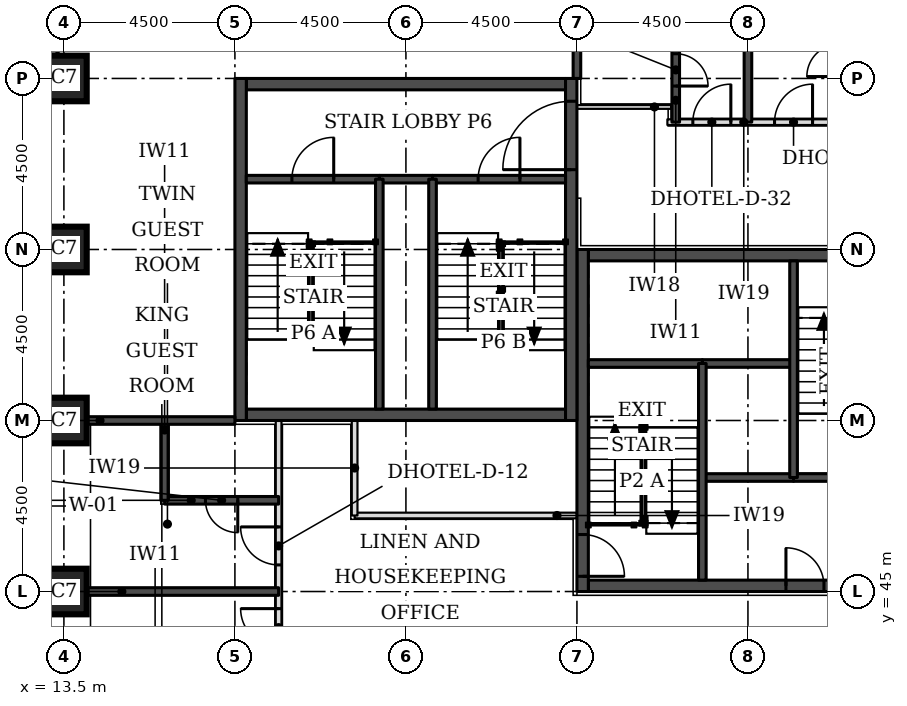
"""IFC4 building model, lengths in metres.
Left out: names, types, materials, properties, quantities, classifications, styles, units other than length and angle.
Written with IfcOpenShell. Run it as: python <this file> out.ifc"""

import sys

from ifc_helpers import new_model, si_unit, direction, frame, frame_2d, origin, origin_2d, place, context, subcontext, project, spatial, rectangle, extrude, element, fill, save


model = new_model("IFC4")
c1 = context("Model", 3, precision=1e-05, world=origin(), true_north=direction((0.0, 1.0)))
c2 = subcontext(c1, "Body", "Model", "MODEL_VIEW")
j1 = project(units=[si_unit("LENGTHUNIT", "METRE"), si_unit("PLANEANGLEUNIT", "RADIAN")], contexts=[c1])
p1 = place(None, origin())
s1 = spatial("IfcSite", under=j1, at=p1, CompositionType="ELEMENT")
p2 = place(p1, origin())
s2 = spatial("IfcBuilding", under=s1, at=p2, CompositionType="ELEMENT")
p3 = place(p2, frame((0.0, 0.0, 59.4)))
s3 = spatial("IfcBuildingStorey", under=s2, at=p3, CompositionType="ELEMENT", Elevation=59.4)
for number, where, z_axis, x_axis in (
    (1, (13.5, 45.0, 0.0), (0.0, 0.0, 1.0), (1.0, 0.0, 0.0)),
    (2, (13.5, 49.5, 0.0), (0.0, 0.0, 1.0), (1.0, 0.0, 0.0)),
    (3, (13.5, 54.0, 0.0), (0.0, 0.0, 1.0), (1.0, 0.0, 0.0)),
    (4, (13.5, 58.5, 0.0), (0.0, 0.0, 1.0), (1.0, 0.0, 0.0)),
):
    element("IfcColumn", number, at=place(p3, frame(where, z_axis=z_axis, x_axis=x_axis)), inside=s3, PredefinedType="COLUMN", context=c2, shape_type="SweptSolid", body=[
        extrude(rectangle(XDim=1.2, YDim=1.2, at=origin_2d()), origin(), (0.0, 0.0, 1.0), 3.3),
    ])
p4 = place(p3, frame((27.3, 45.15, 0.0), z_axis=(0.0, 0.0, 1.0), x_axis=(1.0, 0.0, 0.0)))
e5 = element("IfcWall", 5, at=p4, inside=s3, PredefinedType="SHEAR", context=c2, shape_type="SweptSolid", body=[
    extrude(rectangle(XDim=8.4, YDim=0.3, at=frame_2d((4.2, 0.0))), origin(), (0.0, 0.0, 1.0), 3.3),
])
p5 = place(p4, frame((5.2, 0.0, 0.0)))
e6 = element("IfcOpeningElement", 6, at=p5, cuts=e5, PredefinedType="OPENING", context=c2, shape_type="SweptSolid", body=[
    extrude(rectangle(XDim=1.0, YDim=2.1, at=frame_2d((0.5, 1.05))), frame((0.0, 0.16, 0.0), z_axis=(0.0, -1.0, 0.0), x_axis=(1.0, 0.0, 0.0)), (0.0, 0.0, 1.0), 0.32),
])
p6 = place(p3, frame((27.3, 53.85, 0.0), z_axis=(0.0, 0.0, 1.0), x_axis=(1.0, 0.0, 0.0)))
e7 = element("IfcWall", 7, at=p6, inside=s3, PredefinedType="SHEAR", context=c2, shape_type="SweptSolid", body=[
    extrude(rectangle(XDim=8.4, YDim=0.3, at=frame_2d((4.2, 0.0))), origin(), (0.0, 0.0, 1.0), 3.3),
])
p7 = place(p6, frame((6.4, 0.0, 0.0)))
e8 = element("IfcOpeningElement", 8, at=p7, cuts=e7, PredefinedType="OPENING", context=c2, shape_type="SweptSolid", body=[
    extrude(rectangle(XDim=1.1, YDim=2.1, at=frame_2d((0.55, 1.05))), frame((0.0, 0.16, 0.0), z_axis=(0.0, -1.0, 0.0), x_axis=(1.0, 0.0, 0.0)), (0.0, 0.0, 1.0), 0.32),
])
p8 = place(p3, frame((27.15, 45.0, 0.0), z_axis=(0.0, 0.0, 1.0), x_axis=(0.0, 1.0, 0.0)))
e9 = element("IfcWall", 9, at=p8, inside=s3, PredefinedType="SHEAR", context=c2, shape_type="SweptSolid", body=[
    extrude(rectangle(XDim=9.0, YDim=0.3, at=frame_2d((4.5, 0.0))), origin(), (0.0, 0.0, 1.0), 3.3),
])
p9 = place(p8, frame((0.4, 0.0, 0.0)))
e10 = element("IfcOpeningElement", 10, at=p9, cuts=e9, PredefinedType="OPENING", context=c2, shape_type="SweptSolid", body=[
    extrude(rectangle(XDim=1.1, YDim=2.1, at=frame_2d((0.55, 1.05))), frame((0.0, 0.16, 0.0), z_axis=(0.0, -1.0, 0.0), x_axis=(1.0, 0.0, 0.0)), (0.0, 0.0, 1.0), 0.32),
])
for number, where, z_axis, x_axis in (
    (11, (18.3, 49.65, 0.0), (0.0, 0.0, 1.0), (1.0, 0.0, 0.0)),
    (12, (18.3, 58.35, 0.0), (0.0, 0.0, 1.0), (1.0, 0.0, 0.0)),
):
    element("IfcWall", number, at=place(p3, frame(where, z_axis=z_axis, x_axis=x_axis)), inside=s3, PredefinedType="SHEAR", context=c2, shape_type="SweptSolid", body=[
        extrude(rectangle(XDim=8.4, YDim=0.3, at=frame_2d((4.2, 0.0))), origin(), (0.0, 0.0, 1.0), 3.3),
    ])
p10 = place(p3, frame((18.15, 49.5, 0.0), z_axis=(0.0, 0.0, 1.0), x_axis=(0.0, 1.0, 0.0)))
e13 = element("IfcWall", 13, at=p10, inside=s3, PredefinedType="SHEAR", context=c2, shape_type="SweptSolid", body=[
    extrude(rectangle(XDim=9.0, YDim=0.3, at=frame_2d((4.5, 0.0))), origin(), (0.0, 0.0, 1.0), 3.3),
])
p11 = place(p3, frame((26.85, 49.5, 0.0), z_axis=(0.0, 0.0, 1.0), x_axis=(0.0, 1.0, 0.0)))
e14 = element("IfcWall", 14, at=p11, inside=s3, PredefinedType="SHEAR", context=c2, shape_type="SweptSolid", body=[
    extrude(rectangle(XDim=9.0, YDim=0.3, at=frame_2d((4.5, 0.0))), origin(), (0.0, 0.0, 1.0), 3.3),
])
p12 = place(p11, frame((6.6, 0.0, 0.0)))
e15 = element("IfcOpeningElement", 15, at=p12, cuts=e14, PredefinedType="OPENING", context=c2, shape_type="SweptSolid", body=[
    extrude(rectangle(XDim=1.8, YDim=2.1, at=frame_2d((0.9, 1.05))), frame((0.0, 0.16, 0.0), z_axis=(0.0, -1.0, 0.0), x_axis=(1.0, 0.0, 0.0)), (0.0, 0.0, 1.0), 0.32),
])
p13 = place(p3, frame((17.73, 63.826, 0.0), z_axis=(0.0, 0.0, 1.0), x_axis=(-0.707106781187, -0.707106781187, 0.0)))
e16 = element("IfcWall", 16, at=p13, inside=s3, PredefinedType="STANDARD", context=c2, shape_type="SweptSolid", body=[
    extrude(rectangle(XDim=7.151, YDim=0.35, at=frame_2d((3.576, 0.0))), origin(), (0.0, 0.0, 1.0), 3.055),
])
p14 = place(p13, frame((1.926, 0.0, 0.8)))
e17 = element("IfcOpeningElement", 17, at=p14, cuts=e16, PredefinedType="OPENING", context=c2, shape_type="SweptSolid", body=[
    extrude(rectangle(XDim=3.3, YDim=1.5, at=frame_2d((1.65, 0.75))), frame((0.0, 0.185, 0.0), z_axis=(0.0, -1.0, 0.0), x_axis=(1.0, 0.0, 0.0)), (0.0, 0.0, 1.0), 0.37),
])
p15 = place(p3, frame((19.15, 25.15, 0.0), z_axis=(0.0, 0.0, 1.0), x_axis=(0.0, 1.0, 0.0)))
e18 = element("IfcWall", 18, at=p15, inside=s3, PredefinedType="PARTITIONING", context=c2, shape_type="SweptSolid", body=[
    extrude(rectangle(XDim=24.35, YDim=0.15, at=frame_2d((12.175, 0.0))), origin(), (0.0, 0.0, 1.0), 3.08),
])
p16 = place(p15, frame((0.4, 0.0, 0.0)))
e19 = element("IfcOpeningElement", 19, at=p16, cuts=e18, PredefinedType="OPENING", context=c2, shape_type="SweptSolid", body=[
    extrude(rectangle(XDim=1.0, YDim=2.1, at=frame_2d((0.5, 1.05))), frame((0.0, 0.085, 0.0), z_axis=(0.0, -1.0, 0.0), x_axis=(1.0, 0.0, 0.0)), (0.0, 0.0, 1.0), 0.17),
])
p17 = place(p15, frame((2.55, 0.0, 0.0)))
e20 = element("IfcOpeningElement", 20, at=p17, cuts=e18, PredefinedType="OPENING", context=c2, shape_type="SweptSolid", body=[
    extrude(rectangle(XDim=1.0, YDim=2.1, at=frame_2d((0.5, 1.05))), frame((0.0, 0.085, 0.0), z_axis=(0.0, -1.0, 0.0), x_axis=(1.0, 0.0, 0.0)), (0.0, 0.0, 1.0), 0.17),
])
p18 = place(p15, frame((9.4, 0.0, 0.0)))
e21 = element("IfcOpeningElement", 21, at=p18, cuts=e18, PredefinedType="OPENING", context=c2, shape_type="SweptSolid", body=[
    extrude(rectangle(XDim=1.0, YDim=2.1, at=frame_2d((0.5, 1.05))), frame((0.0, 0.085, 0.0), z_axis=(0.0, -1.0, 0.0), x_axis=(1.0, 0.0, 0.0)), (0.0, 0.0, 1.0), 0.17),
])
p19 = place(p15, frame((11.55, 0.0, 0.0)))
e22 = element("IfcOpeningElement", 22, at=p19, cuts=e18, PredefinedType="OPENING", context=c2, shape_type="SweptSolid", body=[
    extrude(rectangle(XDim=1.0, YDim=2.1, at=frame_2d((0.5, 1.05))), frame((0.0, 0.085, 0.0), z_axis=(0.0, -1.0, 0.0), x_axis=(1.0, 0.0, 0.0)), (0.0, 0.0, 1.0), 0.17),
])
p20 = place(p15, frame((18.4, 0.0, 0.0)))
e23 = element("IfcOpeningElement", 23, at=p20, cuts=e18, PredefinedType="OPENING", context=c2, shape_type="SweptSolid", body=[
    extrude(rectangle(XDim=1.0, YDim=2.1, at=frame_2d((0.5, 1.05))), frame((0.0, 0.085, 0.0), z_axis=(0.0, -1.0, 0.0), x_axis=(1.0, 0.0, 0.0)), (0.0, 0.0, 1.0), 0.17),
])
p21 = place(p15, frame((20.55, 0.0, 0.0)))
e24 = element("IfcOpeningElement", 24, at=p21, cuts=e18, PredefinedType="OPENING", context=c2, shape_type="SweptSolid", body=[
    extrude(rectangle(XDim=1.0, YDim=2.1, at=frame_2d((0.5, 1.05))), frame((0.0, 0.085, 0.0), z_axis=(0.0, -1.0, 0.0), x_axis=(1.0, 0.0, 0.0)), (0.0, 0.0, 1.0), 0.17),
])
p22 = place(p3, frame((21.15, 47.0, 0.0), z_axis=(0.0, 0.0, 1.0), x_axis=(1.0, 0.0, 0.0)))
e25 = element("IfcWall", 25, at=p22, inside=s3, PredefinedType="PARTITIONING", context=c2, shape_type="SweptSolid", body=[
    extrude(rectangle(XDim=5.85, YDim=0.15, at=frame_2d((2.925, 0.0))), origin(), (0.0, 0.0, 1.0), 3.08),
])
p23 = place(p3, frame((21.15, 47.0, 0.0), z_axis=(0.0, 0.0, 1.0), x_axis=(0.0, 1.0, 0.0)))
e26 = element("IfcWall", 26, at=p23, inside=s3, PredefinedType="PARTITIONING", context=c2, shape_type="SweptSolid", body=[
    extrude(rectangle(XDim=2.5, YDim=0.15, at=frame_2d((1.25, 0.0))), origin(), (0.0, 0.0, 1.0), 3.08),
])
p24 = place(p3, frame((29.38, 57.35, 0.0), z_axis=(0.0, 0.0, 1.0), x_axis=(1.0, 0.0, 0.0)))
e27 = element("IfcWall", 27, at=p24, inside=s3, PredefinedType="PARTITIONING", context=c2, shape_type="SweptSolid", body=[
    extrude(rectangle(XDim=13.62, YDim=0.15, at=frame_2d((6.81, 0.0))), origin(), (0.0, 0.0, 1.0), 3.08),
])
p25 = place(p24, frame((2.82, 0.0, 0.0)))
e28 = element("IfcOpeningElement", 28, at=p25, cuts=e27, PredefinedType="OPENING", context=c2, shape_type="SweptSolid", body=[
    extrude(rectangle(XDim=1.0, YDim=2.1, at=frame_2d((0.5, 1.05))), frame((0.0, 0.085, 0.0), z_axis=(0.0, -1.0, 0.0), x_axis=(1.0, 0.0, 0.0)), (0.0, 0.0, 1.0), 0.17),
])
p26 = place(p24, frame((0.67, 0.0, 0.0)))
e29 = element("IfcOpeningElement", 29, at=p26, cuts=e27, PredefinedType="OPENING", context=c2, shape_type="SweptSolid", body=[
    extrude(rectangle(XDim=1.0, YDim=2.1, at=frame_2d((0.5, 1.05))), frame((0.0, 0.085, 0.0), z_axis=(0.0, -1.0, 0.0), x_axis=(1.0, 0.0, 0.0)), (0.0, 0.0, 1.0), 0.17),
])
p27 = place(p24, frame((9.67, 0.0, 0.0)))
e30 = element("IfcOpeningElement", 30, at=p27, cuts=e27, PredefinedType="OPENING", context=c2, shape_type="SweptSolid", body=[
    extrude(rectangle(XDim=0.9, YDim=2.1, at=frame_2d((0.45, 1.05))), frame((0.0, 0.085, 0.0), z_axis=(0.0, -1.0, 0.0), x_axis=(1.0, 0.0, 0.0)), (0.0, 0.0, 1.0), 0.17),
])
p28 = place(p3, frame((14.1, 45.0, 0.0), z_axis=(0.0, 0.0, 1.0), x_axis=(1.0, 0.0, 0.0)))
e31 = element("IfcWall", 31, at=p28, inside=s3, PredefinedType="SOLIDWALL", context=c2, shape_type="SweptSolid", body=[
    extrude(rectangle(XDim=5.05, YDim=0.2, at=frame_2d((2.525, 0.0))), origin(), (0.0, 0.0, 1.0), 3.08),
])
p29 = place(p3, frame((16.15, 47.4, 0.0), z_axis=(0.0, 0.0, 1.0), x_axis=(1.0, 0.0, 0.0)))
e32 = element("IfcWall", 32, at=p29, inside=s3, PredefinedType="SOLIDWALL", context=c2, shape_type="SweptSolid", body=[
    extrude(rectangle(XDim=3.0, YDim=0.2, at=frame_2d((1.5, 0.0))), origin(), (0.0, 0.0, 1.0), 3.08),
])
p30 = place(p29, frame((1.075, 0.0, 0.0)))
e33 = element("IfcOpeningElement", 33, at=p30, cuts=e32, PredefinedType="OPENING", context=c2, shape_type="SweptSolid", body=[
    extrude(rectangle(XDim=0.85, YDim=2.1, at=frame_2d((0.425, 1.05))), frame((0.0, 0.11, 0.0), z_axis=(0.0, -1.0, 0.0), x_axis=(1.0, 0.0, 0.0)), (0.0, 0.0, 1.0), 0.22),
])
p31 = place(p3, frame((16.15, 47.4, 0.0), z_axis=(0.0, 0.0, 1.0), x_axis=(0.0, 1.0, 0.0)))
e34 = element("IfcWall", 34, at=p31, inside=s3, PredefinedType="SOLIDWALL", context=c2, shape_type="SweptSolid", body=[
    extrude(rectangle(XDim=2.1, YDim=0.2, at=frame_2d((1.05, 0.0))), origin(), (0.0, 0.0, 1.0), 3.08),
])
for number, where, z_axis, x_axis in (
    (35, (14.1, 49.5, 0.0), (0.0, 0.0, 1.0), (1.0, 0.0, 0.0)),
    (36, (27.0, 58.5, 0.0), (0.0, 0.0, 1.0), (0.0, 1.0, 0.0)),
):
    element("IfcWall", number, at=place(p3, frame(where, z_axis=z_axis, x_axis=x_axis)), inside=s3, PredefinedType="SOLIDWALL", context=c2, shape_type="SweptSolid", body=[
        extrude(rectangle(XDim=3.9, YDim=0.2, at=frame_2d((1.95, 0.0))), origin(), (0.0, 0.0, 1.0), 3.08),
    ])
p32 = place(p3, frame((29.6, 57.35, 0.0), z_axis=(0.0, 0.0, 1.0), x_axis=(0.0, 1.0, 0.0)))
e37 = element("IfcWall", 37, at=p32, inside=s3, PredefinedType="SOLIDWALL", context=c2, shape_type="SweptSolid", body=[
    extrude(rectangle(XDim=2.75, YDim=0.2, at=frame_2d((1.375, 0.0))), origin(), (0.0, 0.0, 1.0), 3.08),
])
p33 = place(p32, frame((0.95, 0.0, 0.0)))
e38 = element("IfcOpeningElement", 38, at=p33, cuts=e37, PredefinedType="OPENING", context=c2, shape_type="SweptSolid", body=[
    extrude(rectangle(XDim=0.85, YDim=2.1, at=frame_2d((0.425, 1.05))), frame((0.0, 0.11, 0.0), z_axis=(0.0, -1.0, 0.0), x_axis=(1.0, 0.0, 0.0)), (0.0, 0.0, 1.0), 0.22),
])
p34 = place(p3, frame((31.5, 57.35, 0.0), z_axis=(0.0, 0.0, 1.0), x_axis=(0.0, 1.0, 0.0)))
e39 = element("IfcWall", 39, at=p34, inside=s3, PredefinedType="SOLIDWALL", context=c2, shape_type="SweptSolid", body=[
    extrude(rectangle(XDim=5.05, YDim=0.2, at=frame_2d((2.525, 0.0))), origin(), (0.0, 0.0, 1.0), 3.08),
])
p35 = place(p3, frame((27.0, 57.75, 0.0), z_axis=(0.0, 0.0, 1.0), x_axis=(1.0, 0.0, 0.0)))
e40 = element("IfcWall", 40, at=p35, inside=s3, PredefinedType="PARTITIONING", context=c2, shape_type="SweptSolid", body=[
    extrude(rectangle(XDim=2.48, YDim=0.1, at=frame_2d((1.24, 0.0))), origin(), (0.0, 0.0, 1.0), 3.08),
])
p36 = place(p3, frame((30.3, 48.0, 0.0), z_axis=(0.0, 0.0, 1.0), x_axis=(1.0, 0.0, 0.0)))
e41 = element("IfcWall", 41, at=p36, inside=s3, PredefinedType="SOLIDWALL", context=c2, shape_type="SweptSolid", body=[
    extrude(rectangle(XDim=2.4, YDim=0.2, at=frame_2d((1.2, 0.0))), origin(), (0.0, 0.0, 1.0), 3.08),
])
p37 = place(p3, frame((32.7, 48.0, 0.0), z_axis=(0.0, 0.0, 1.0), x_axis=(1.0, 0.0, 0.0)))
e42 = element("IfcWall", 42, at=p37, inside=s3, PredefinedType="SOLIDWALL", context=c2, shape_type="SweptSolid", body=[
    extrude(rectangle(XDim=3.0, YDim=0.2, at=frame_2d((1.5, 0.0))), origin(), (0.0, 0.0, 1.0), 3.08),
])
p38 = place(p3, frame((30.3, 51.0, 0.0), z_axis=(0.0, 0.0, 1.0), x_axis=(1.0, 0.0, 0.0)))
e43 = element("IfcWall", 43, at=p38, inside=s3, PredefinedType="SOLIDWALL", context=c2, shape_type="SweptSolid", body=[
    extrude(rectangle(XDim=2.4, YDim=0.2, at=frame_2d((1.2, 0.0))), origin(), (0.0, 0.0, 1.0), 3.3),
])
p39 = place(p3, frame((27.3, 51.0, 0.0), z_axis=(0.0, 0.0, 1.0), x_axis=(1.0, 0.0, 0.0)))
e44 = element("IfcWall", 44, at=p39, inside=s3, PredefinedType="SOLIDWALL", context=c2, shape_type="SweptSolid", body=[
    extrude(rectangle(XDim=3.0, YDim=0.2, at=frame_2d((1.5, 0.0))), origin(), (0.0, 0.0, 1.0), 3.08),
])
for number, where, z_axis, x_axis in (
    (45, (30.3, 45.3, 0.0), (0.0, 0.0, 1.0), (0.0, 1.0, 0.0)),
    (46, (32.7, 48.0, 0.0), (0.0, 0.0, 1.0), (0.0, 1.0, 0.0)),
):
    element("IfcWall", number, at=place(p3, frame(where, z_axis=z_axis, x_axis=x_axis)), inside=s3, PredefinedType="SOLIDWALL", context=c2, shape_type="SweptSolid", body=[
        extrude(rectangle(XDim=5.7, YDim=0.2, at=frame_2d((2.85, 0.0))), origin(), (0.0, 0.0, 1.0), 3.08),
    ])
p40 = place(p3, frame((21.8, 55.85, 0.0), z_axis=(0.0, 0.0, 1.0), x_axis=(1.0, 0.0, 0.0)))
e47 = element("IfcWall", 47, at=p40, inside=s3, PredefinedType="SOLIDWALL", context=c2, shape_type="SweptSolid", body=[
    extrude(rectangle(XDim=1.4, YDim=0.2, at=frame_2d((0.7, 0.0))), origin(), (0.0, 0.0, 1.0), 3.08),
])
p41 = place(p3, frame((18.3, 55.85, 0.0), z_axis=(0.0, 0.0, 1.0), x_axis=(1.0, 0.0, 0.0)))
e48 = element("IfcWall", 48, at=p41, inside=s3, PredefinedType="SOLIDWALL", context=c2, shape_type="SweptSolid", body=[
    extrude(rectangle(XDim=3.5, YDim=0.2, at=frame_2d((1.75, 0.0))), origin(), (0.0, 0.0, 1.0), 3.08),
])
p42 = place(p41, frame((1.2, 0.0, 0.0)))
e49 = element("IfcOpeningElement", 49, at=p42, cuts=e48, PredefinedType="OPENING", context=c2, shape_type="SweptSolid", body=[
    extrude(rectangle(XDim=1.1, YDim=2.1, at=frame_2d((0.55, 1.05))), frame((0.0, 0.11, 0.0), z_axis=(0.0, -1.0, 0.0), x_axis=(1.0, 0.0, 0.0)), (0.0, 0.0, 1.0), 0.22),
])
p43 = place(p3, frame((23.2, 55.85, 0.0), z_axis=(0.0, 0.0, 1.0), x_axis=(1.0, 0.0, 0.0)))
e50 = element("IfcWall", 50, at=p43, inside=s3, PredefinedType="SOLIDWALL", context=c2, shape_type="SweptSolid", body=[
    extrude(rectangle(XDim=3.5, YDim=0.2, at=frame_2d((1.75, 0.0))), origin(), (0.0, 0.0, 1.0), 3.08),
])
p44 = place(p43, frame((1.2, 0.0, 0.0)))
e51 = element("IfcOpeningElement", 51, at=p44, cuts=e50, PredefinedType="OPENING", context=c2, shape_type="SweptSolid", body=[
    extrude(rectangle(XDim=1.1, YDim=2.1, at=frame_2d((0.55, 1.05))), frame((0.0, 0.11, 0.0), z_axis=(0.0, -1.0, 0.0), x_axis=(1.0, 0.0, 0.0)), (0.0, 0.0, 1.0), 0.22),
])
for number, where, z_axis, x_axis in (
    (52, (21.8, 49.8, 0.0), (0.0, 0.0, 1.0), (0.0, 1.0, 0.0)),
    (53, (23.2, 49.8, 0.0), (0.0, 0.0, 1.0), (0.0, 1.0, 0.0)),
):
    element("IfcWall", number, at=place(p3, frame(where, z_axis=z_axis, x_axis=x_axis)), inside=s3, PredefinedType="SOLIDWALL", context=c2, shape_type="SweptSolid", body=[
        extrude(rectangle(XDim=6.05, YDim=0.2, at=frame_2d((3.025, 0.0))), origin(), (0.0, 0.0, 1.0), 3.08),
    ])
p45 = place(p20, origin())
e54 = element("IfcDoor", 54, at=p45, inside=s3, OperationType="SINGLE_SWING_RIGHT", PredefinedType="DOOR", context=c2, shape_type="SweptSolid", body=[
    extrude(rectangle(XDim=1.0, YDim=2.1, at=frame_2d((0.5, 1.05))), frame((0.0, 0.025, 0.0), z_axis=(0.0, -1.0, 0.0), x_axis=(1.0, 0.0, 0.0)), (0.0, 0.0, 1.0), 0.05),
])
fill(e23, e54)
p46 = place(p21, origin())
e55 = element("IfcDoor", 55, at=p46, inside=s3, OperationType="SINGLE_SWING_RIGHT", PredefinedType="DOOR", context=c2, shape_type="SweptSolid", body=[
    extrude(rectangle(XDim=1.0, YDim=2.1, at=frame_2d((0.5, 1.05))), frame((0.0, 0.025, 0.0), z_axis=(0.0, -1.0, 0.0), x_axis=(1.0, 0.0, 0.0)), (0.0, 0.0, 1.0), 0.05),
])
fill(e24, e55)
p47 = place(p30, frame((0.85, 0.0, 0.0), z_axis=(0.0, 0.0, 1.0), x_axis=(-1.0, 0.0, 0.0)))
e56 = element("IfcDoor", 56, at=p47, inside=s3, OperationType="SINGLE_SWING_LEFT", PredefinedType="DOOR", context=c2, shape_type="SweptSolid", body=[
    extrude(rectangle(XDim=0.85, YDim=2.1, at=frame_2d((0.425, 1.05))), frame((0.0, 0.025, 0.0), z_axis=(0.0, -1.0, 0.0), x_axis=(1.0, 0.0, 0.0)), (0.0, 0.0, 1.0), 0.05),
])
fill(e33, e56)
p48 = place(p25, origin())
e57 = element("IfcDoor", 57, at=p48, inside=s3, OperationType="SINGLE_SWING_RIGHT", PredefinedType="DOOR", context=c2, shape_type="SweptSolid", body=[
    extrude(rectangle(XDim=1.0, YDim=2.1, at=frame_2d((0.5, 1.05))), frame((0.0, 0.025, 0.0), z_axis=(0.0, -1.0, 0.0), x_axis=(1.0, 0.0, 0.0)), (0.0, 0.0, 1.0), 0.05),
])
fill(e28, e57)
p49 = place(p26, origin())
e58 = element("IfcDoor", 58, at=p49, inside=s3, OperationType="SINGLE_SWING_RIGHT", PredefinedType="DOOR", context=c2, shape_type="SweptSolid", body=[
    extrude(rectangle(XDim=1.0, YDim=2.1, at=frame_2d((0.5, 1.05))), frame((0.0, 0.025, 0.0), z_axis=(0.0, -1.0, 0.0), x_axis=(1.0, 0.0, 0.0)), (0.0, 0.0, 1.0), 0.05),
])
fill(e29, e58)
p50 = place(p33, frame((0.85, 0.0, 0.0), z_axis=(0.0, 0.0, 1.0), x_axis=(-1.0, 0.0, 0.0)))
e59 = element("IfcDoor", 59, at=p50, inside=s3, OperationType="SINGLE_SWING_RIGHT", PredefinedType="DOOR", context=c2, shape_type="SweptSolid", body=[
    extrude(rectangle(XDim=0.85, YDim=2.1, at=frame_2d((0.425, 1.05))), frame((0.0, 0.025, 0.0), z_axis=(0.0, -1.0, 0.0), x_axis=(1.0, 0.0, 0.0)), (0.0, 0.0, 1.0), 0.05),
])
fill(e38, e59)
p51 = place(p9, frame((1.1, 0.0, 0.0), z_axis=(0.0, 0.0, 1.0), x_axis=(-1.0, 0.0, 0.0)))
e60 = element("IfcDoor", 60, at=p51, inside=s3, OperationType="SINGLE_SWING_RIGHT", PredefinedType="DOOR", context=c2, shape_type="SweptSolid", body=[
    extrude(rectangle(XDim=1.1, YDim=2.1, at=frame_2d((0.55, 1.05))), frame((0.0, 0.025, 0.0), z_axis=(0.0, -1.0, 0.0), x_axis=(1.0, 0.0, 0.0)), (0.0, 0.0, 1.0), 0.05),
])
fill(e10, e60)
p52 = place(p5, origin())
e61 = element("IfcDoor", 61, at=p52, inside=s3, OperationType="SINGLE_SWING_LEFT", PredefinedType="DOOR", context=c2, shape_type="SweptSolid", body=[
    extrude(rectangle(XDim=1.0, YDim=2.1, at=frame_2d((0.5, 1.05))), frame((0.0, 0.025, 0.0), z_axis=(0.0, -1.0, 0.0), x_axis=(1.0, 0.0, 0.0)), (0.0, 0.0, 1.0), 0.05),
])
fill(e6, e61)
p53 = place(p42, origin())
e62 = element("IfcDoor", 62, at=p53, inside=s3, OperationType="SINGLE_SWING_RIGHT", PredefinedType="DOOR", context=c2, shape_type="SweptSolid", body=[
    extrude(rectangle(XDim=1.1, YDim=2.1, at=frame_2d((0.55, 1.05))), frame((0.0, 0.025, 0.0), z_axis=(0.0, -1.0, 0.0), x_axis=(1.0, 0.0, 0.0)), (0.0, 0.0, 1.0), 0.05),
])
fill(e49, e62)
p54 = place(p44, origin())
e63 = element("IfcDoor", 63, at=p54, inside=s3, OperationType="SINGLE_SWING_RIGHT", PredefinedType="DOOR", context=c2, shape_type="SweptSolid", body=[
    extrude(rectangle(XDim=1.1, YDim=2.1, at=frame_2d((0.55, 1.05))), frame((0.0, 0.025, 0.0), z_axis=(0.0, -1.0, 0.0), x_axis=(1.0, 0.0, 0.0)), (0.0, 0.0, 1.0), 0.05),
])
fill(e51, e63)
p55 = place(p12, origin())
e64 = element("IfcDoor", 64, at=p55, inside=s3, OperationType="SINGLE_SWING_LEFT", PredefinedType="DOOR", context=c2, shape_type="SweptSolid", body=[
    extrude(rectangle(XDim=1.8, YDim=2.1, at=frame_2d((0.9, 1.05))), frame((0.0, 0.025, 0.0), z_axis=(0.0, -1.0, 0.0), x_axis=(1.0, 0.0, 0.0)), (0.0, 0.0, 1.0), 0.05),
])
fill(e15, e64)
save(model, sys.argv[1])
